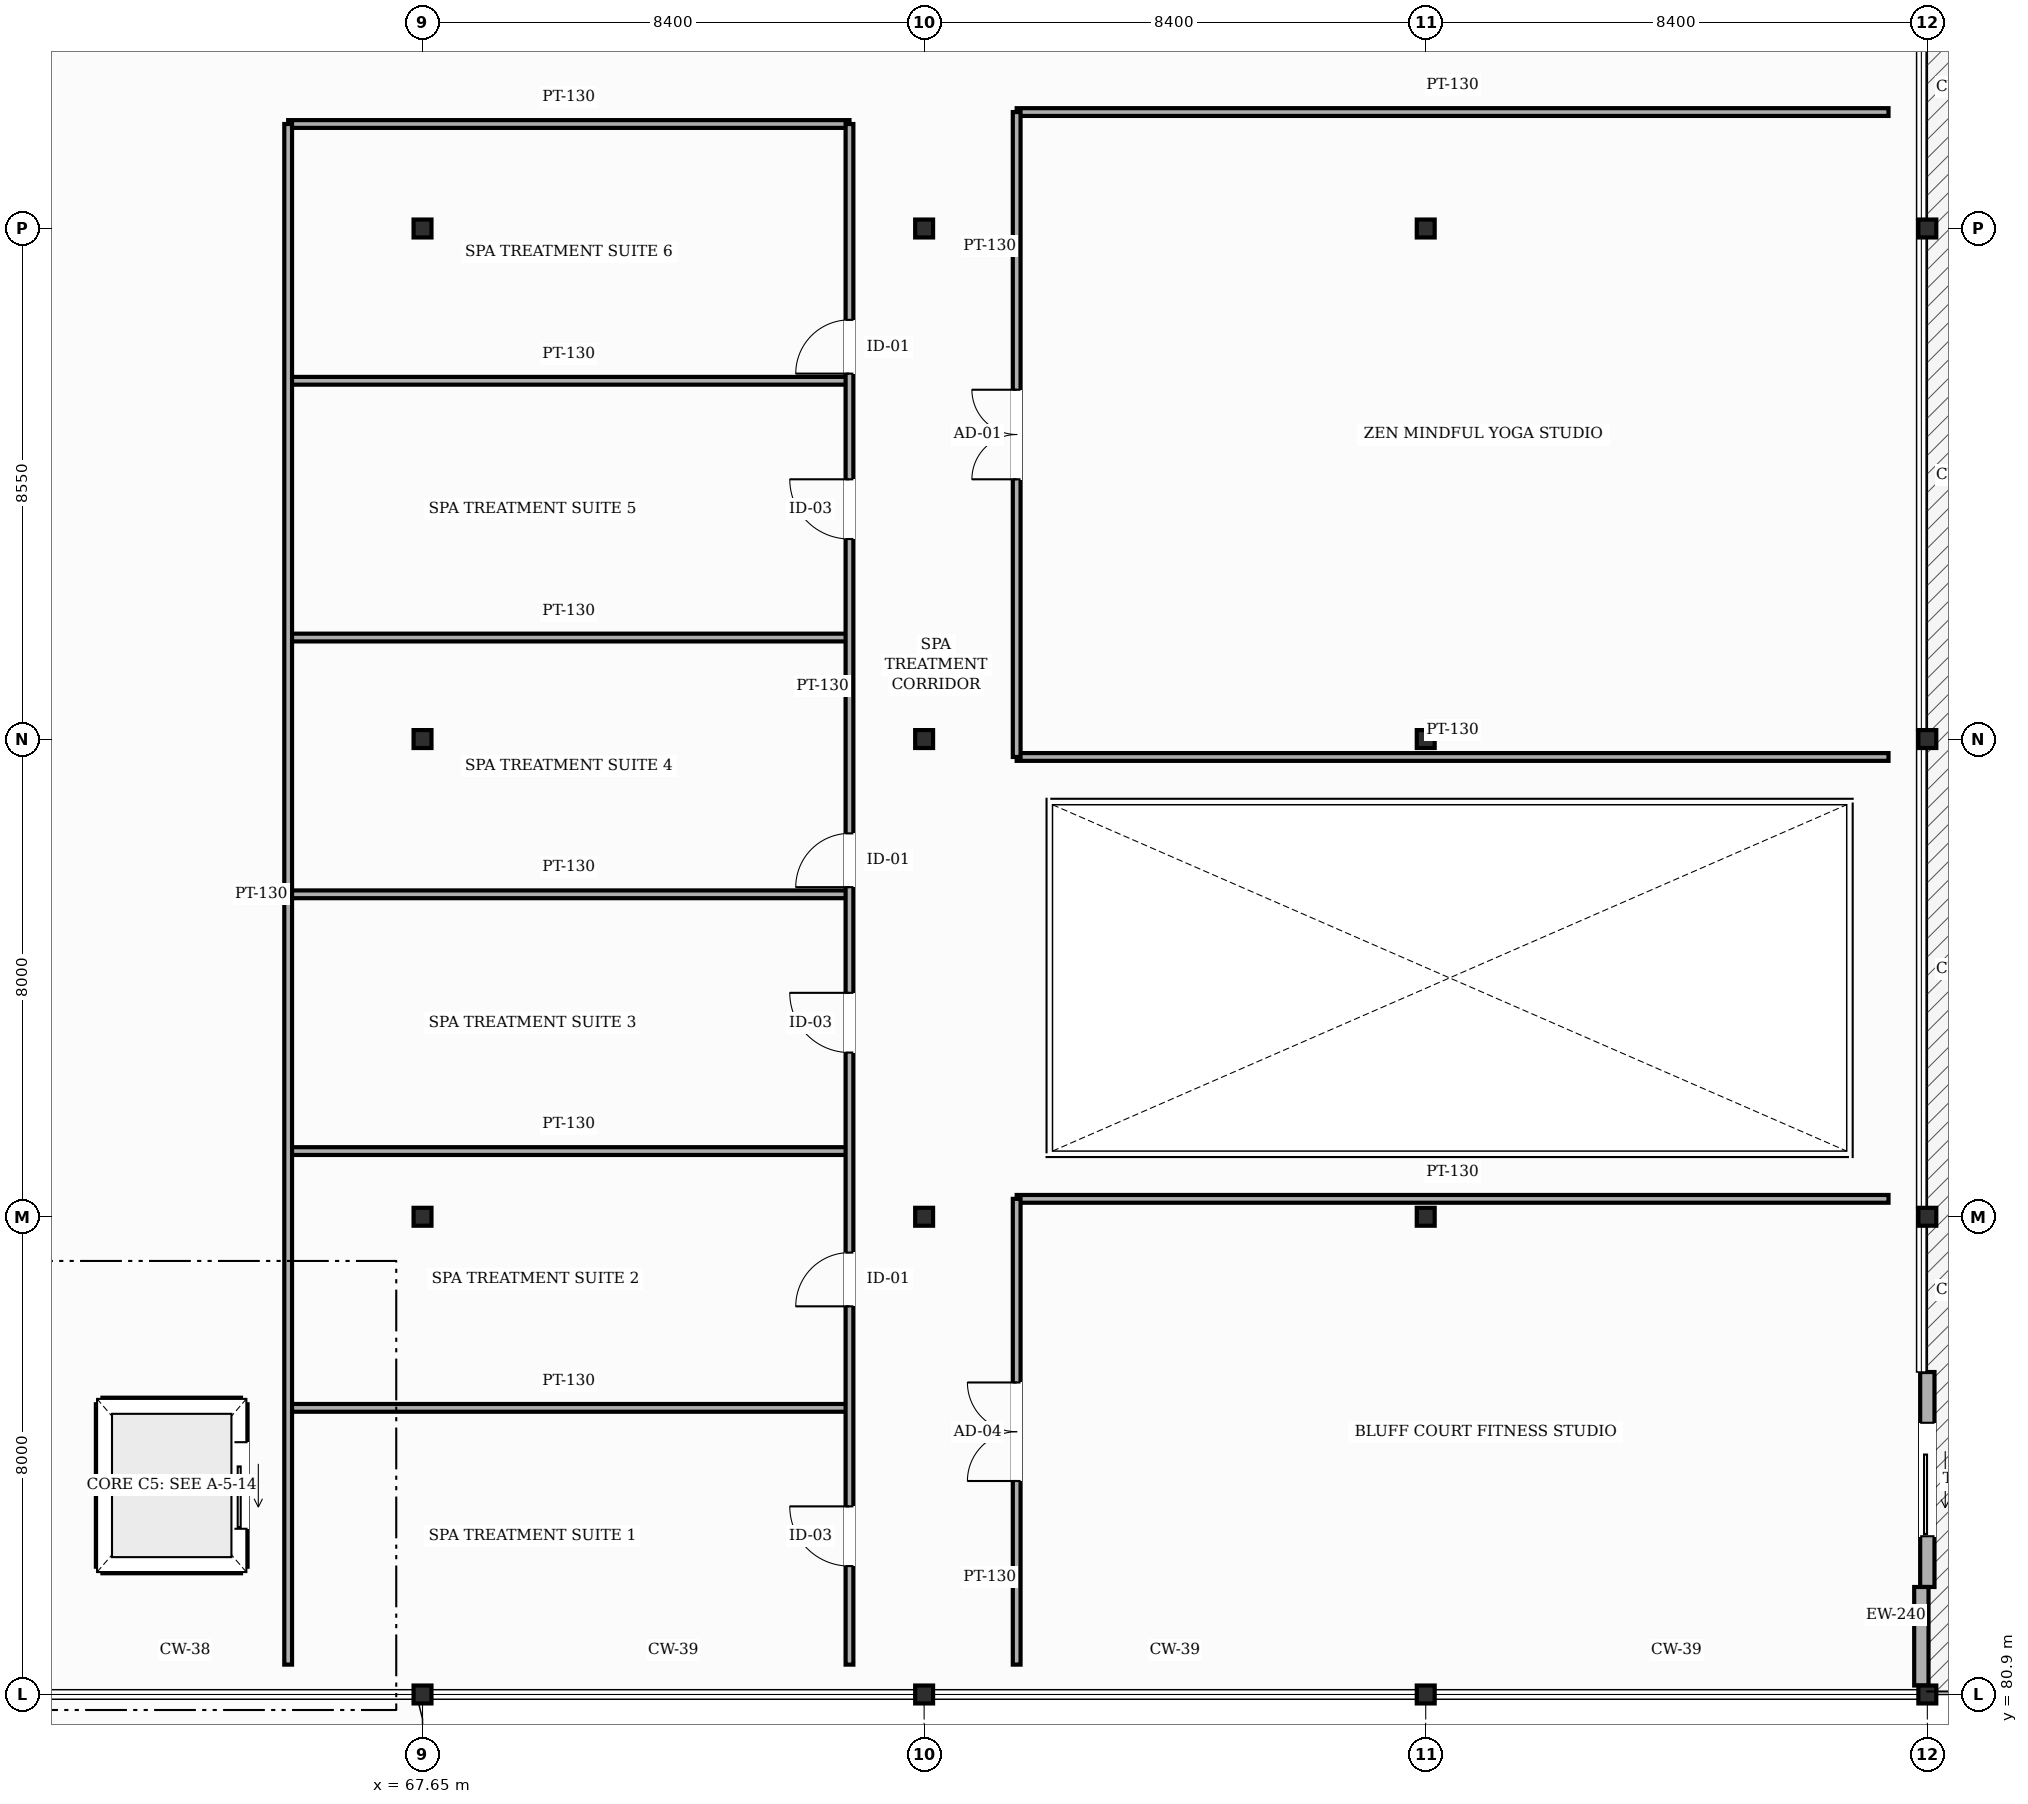
"""IFC4 building model, lengths in metres.
Left out: names, types, materials, properties, quantities, classifications, styles, units other than length and angle.
Written with IfcOpenShell. Run it as: python <this file> out.ifc"""

import sys

from ifc_helpers import new_model, si_unit, direction, frame, frame_2d, origin, origin_2d, place, context, subcontext, project, spatial, rectangle, i_section, extrude, element, fill, save


model = new_model("IFC4")
c1 = context("Model", 3, precision=1e-05, world=origin(), true_north=direction((0.0, 1.0)))
c2 = subcontext(c1, "Body", "Model", "MODEL_VIEW")
j1 = project(units=[si_unit("LENGTHUNIT", "METRE"), si_unit("PLANEANGLEUNIT", "RADIAN")], contexts=[c1])
p1 = place(None, origin())
s1 = spatial("IfcSite", under=j1, at=p1, CompositionType="ELEMENT")
p2 = place(p1, origin())
s2 = spatial("IfcBuilding", under=s1, at=p2, CompositionType="ELEMENT")
p3 = place(p2, frame((0.0, 0.0, 10.2)))
s3 = spatial("IfcBuildingStorey", under=s2, at=p3, CompositionType="ELEMENT", Elevation=10.2)
for number, where, z_axis, x_axis in (
    (1, (67.65, 80.9, 0.0), (0.0, 0.0, 1.0), (1.0, 0.0, 0.0)),
    (2, (67.65, 88.9, 0.0), (0.0, 0.0, 1.0), (1.0, 0.0, 0.0)),
    (3, (67.65, 96.9, 0.0), (0.0, 0.0, 1.0), (1.0, 0.0, 0.0)),
    (4, (67.65, 105.45, 0.0), (0.0, 0.0, 1.0), (1.0, 0.0, 0.0)),
    (5, (76.05, 80.9, 0.0), (0.0, 0.0, 1.0), (1.0, 0.0, 0.0)),
    (6, (76.05, 88.9, 0.0), (0.0, 0.0, 1.0), (1.0, 0.0, 0.0)),
    (7, (76.05, 96.9, 0.0), (0.0, 0.0, 1.0), (1.0, 0.0, 0.0)),
    (8, (76.05, 105.45, 0.0), (0.0, 0.0, 1.0), (1.0, 0.0, 0.0)),
    (9, (84.45, 80.9, 0.0), (0.0, 0.0, 1.0), (1.0, 0.0, 0.0)),
    (10, (84.45, 88.9, 0.0), (0.0, 0.0, 1.0), (1.0, 0.0, 0.0)),
    (11, (84.45, 96.9, 0.0), (0.0, 0.0, 1.0), (1.0, 0.0, 0.0)),
    (12, (84.45, 105.45, 0.0), (0.0, 0.0, 1.0), (1.0, 0.0, 0.0)),
    (13, (92.85, 80.9, 0.0), (0.0, 0.0, 1.0), (1.0, 0.0, 0.0)),
    (14, (92.85, 88.9, 0.0), (0.0, 0.0, 1.0), (1.0, 0.0, 0.0)),
    (15, (92.85, 96.9, 0.0), (0.0, 0.0, 1.0), (1.0, 0.0, 0.0)),
    (16, (92.85, 105.45, 0.0), (0.0, 0.0, 1.0), (1.0, 0.0, 0.0)),
):
    element("IfcColumn", number, at=place(p3, frame(where, z_axis=z_axis, x_axis=x_axis)), inside=s3, PredefinedType="COLUMN", context=c2, shape_type="SweptSolid", body=[
        extrude(i_section(OverallWidth=0.3, OverallDepth=0.3, WebThickness=0.01, FlangeThickness=0.015, FilletRadius=0.013, at=origin_2d()), origin(), (0.0, 0.0, 1.0), 4.8),
    ])
p4 = place(p3, frame((92.85, 82.7, 0.0), z_axis=(0.0, 0.0, 1.0), x_axis=(0.0, 1.0, 0.0)))
e17 = element("IfcWall", 17, at=p4, inside=s3, PredefinedType="SOLIDWALL", context=c2, shape_type="SweptSolid", body=[
    extrude(rectangle(XDim=3.6, YDim=0.24, at=frame_2d((1.8, 0.0))), origin(), (0.0, 0.0, 1.0), 4.545),
])
p5 = place(p4, frame((0.85, 0.0, 0.0)))
e18 = element("IfcOpeningElement", 18, at=p5, cuts=e17, PredefinedType="OPENING", context=c2, shape_type="SweptSolid", body=[
    extrude(rectangle(XDim=1.9, YDim=2.35, at=frame_2d((0.95, 1.175))), frame((0.0, 0.13, 0.0), z_axis=(0.0, -1.0, 0.0), x_axis=(1.0, 0.0, 0.0)), (0.0, 0.0, 1.0), 0.26),
])
p6 = place(p3, frame((92.75, 82.7, 0.0), z_axis=(0.0, 0.0, 1.0), x_axis=(0.0, -1.0, 0.0)))
e19 = element("IfcWall", 19, at=p6, inside=s3, PredefinedType="SOLIDWALL", context=c2, shape_type="SweptSolid", body=[
    extrude(rectangle(XDim=1.65, YDim=0.24, at=frame_2d((0.825, 0.0))), origin(), (0.0, 0.0, 1.0), 4.545),
])
for number, where, z_axis, x_axis in (
    (20, (62.29, 85.76, 0.0), (0.0, 0.0, 1.0), (1.0, 0.0, 0.0)),
    (21, (62.29, 83.04, 0.0), (0.0, 0.0, 1.0), (1.0, 0.0, 0.0)),
):
    element("IfcWall", number, at=place(p3, frame(where, z_axis=z_axis, x_axis=x_axis)), inside=s3, PredefinedType="SHEAR", context=c2, shape_type="SweptSolid", body=[
        extrude(rectangle(XDim=2.32, YDim=0.22, at=frame_2d((1.16, 0.0))), origin(), (0.0, 0.0, 1.0), 4.56),
    ])
p7 = place(p3, frame((64.61, 83.04, 0.0), z_axis=(0.0, 0.0, 1.0), x_axis=(0.0, 1.0, 0.0)))
e22 = element("IfcWall", 22, at=p7, inside=s3, PredefinedType="SHEAR", context=c2, shape_type="SweptSolid", body=[
    extrude(rectangle(XDim=2.72, YDim=0.22, at=frame_2d((1.36, 0.0))), origin(), (0.0, 0.0, 1.0), 4.56),
])
p8 = place(p7, frame((0.635, 0.0, 0.0)))
e23 = element("IfcOpeningElement", 23, at=p8, cuts=e22, PredefinedType="OPENING", context=c2, shape_type="SweptSolid", body=[
    extrude(rectangle(XDim=1.45, YDim=2.35, at=frame_2d((0.725, 1.175))), frame((0.0, 0.12, 0.0), z_axis=(0.0, -1.0, 0.0), x_axis=(1.0, 0.0, 0.0)), (0.0, 0.0, 1.0), 0.24),
])
p9 = place(p3, frame((62.29, 83.04, 0.0), z_axis=(0.0, 0.0, 1.0), x_axis=(0.0, 1.0, 0.0)))
e24 = element("IfcWall", 24, at=p9, inside=s3, PredefinedType="SHEAR", context=c2, shape_type="SweptSolid", body=[
    extrude(rectangle(XDim=2.72, YDim=0.22, at=frame_2d((1.36, 0.0))), origin(), (0.0, 0.0, 1.0), 4.56),
])
p10 = place(p3, frame((65.4, 85.7, 0.0), z_axis=(0.0, 0.0, 1.0), x_axis=(1.0, 0.0, 0.0)))
e25 = element("IfcWall", 25, at=p10, inside=s3, PredefinedType="PARTITIONING", context=c2, shape_type="SweptSolid", body=[
    extrude(rectangle(XDim=9.4, YDim=0.13, at=frame_2d((4.7, 0.0))), origin(), (0.0, 0.0, 1.0), 4.545),
])
p11 = place(p3, frame((77.6, 89.2, 0.0), z_axis=(0.0, 0.0, 1.0), x_axis=(1.0, 0.0, 0.0)))
e26 = element("IfcWall", 26, at=p11, inside=s3, PredefinedType="PARTITIONING", context=c2, shape_type="SweptSolid", body=[
    extrude(rectangle(XDim=14.6, YDim=0.13, at=frame_2d((7.3, 0.0))), origin(), (0.0, 0.0, 1.0), 4.545),
])
for number, where, z_axis, x_axis in (
    (27, (65.4, 90.0, 0.0), (0.0, 0.0, 1.0), (1.0, 0.0, 0.0)),
    (28, (65.4, 94.3, 0.0), (0.0, 0.0, 1.0), (1.0, 0.0, 0.0)),
):
    element("IfcWall", number, at=place(p3, frame(where, z_axis=z_axis, x_axis=x_axis)), inside=s3, PredefinedType="PARTITIONING", context=c2, shape_type="SweptSolid", body=[
        extrude(rectangle(XDim=9.4, YDim=0.13, at=frame_2d((4.7, 0.0))), origin(), (0.0, 0.0, 1.0), 4.545),
    ])
p12 = place(p3, frame((77.6, 96.6, 0.0), z_axis=(0.0, 0.0, 1.0), x_axis=(1.0, 0.0, 0.0)))
e29 = element("IfcWall", 29, at=p12, inside=s3, PredefinedType="PARTITIONING", context=c2, shape_type="SweptSolid", body=[
    extrude(rectangle(XDim=14.6, YDim=0.13, at=frame_2d((7.3, 0.0))), origin(), (0.0, 0.0, 1.0), 4.545),
])
for number, where, z_axis, x_axis in (
    (30, (65.4, 98.6, 0.0), (0.0, 0.0, 1.0), (1.0, 0.0, 0.0)),
    (31, (65.4, 102.9, 0.0), (0.0, 0.0, 1.0), (1.0, 0.0, 0.0)),
    (32, (65.4, 107.2, 0.0), (0.0, 0.0, 1.0), (1.0, 0.0, 0.0)),
):
    element("IfcWall", number, at=place(p3, frame(where, z_axis=z_axis, x_axis=x_axis)), inside=s3, PredefinedType="PARTITIONING", context=c2, shape_type="SweptSolid", body=[
        extrude(rectangle(XDim=9.4, YDim=0.13, at=frame_2d((4.7, 0.0))), origin(), (0.0, 0.0, 1.0), 4.545),
    ])
p13 = place(p3, frame((77.6, 107.4, 0.0), z_axis=(0.0, 0.0, 1.0), x_axis=(1.0, 0.0, 0.0)))
e33 = element("IfcWall", 33, at=p13, inside=s3, PredefinedType="PARTITIONING", context=c2, shape_type="SweptSolid", body=[
    extrude(rectangle(XDim=14.6, YDim=0.13, at=frame_2d((7.3, 0.0))), origin(), (0.0, 0.0, 1.0), 4.545),
])
p14 = place(p3, frame((65.4, 81.4, 0.0), z_axis=(0.0, 0.0, 1.0), x_axis=(0.0, 1.0, 0.0)))
e34 = element("IfcWall", 34, at=p14, inside=s3, PredefinedType="PARTITIONING", context=c2, shape_type="SweptSolid", body=[
    extrude(rectangle(XDim=25.8, YDim=0.13, at=frame_2d((12.9, 0.0))), origin(), (0.0, 0.0, 1.0), 4.545),
])
p15 = place(p3, frame((74.8, 81.4, 0.0), z_axis=(0.0, 0.0, 1.0), x_axis=(0.0, 1.0, 0.0)))
e35 = element("IfcWall", 35, at=p15, inside=s3, PredefinedType="PARTITIONING", context=c2, shape_type="SweptSolid", body=[
    extrude(rectangle(XDim=25.8, YDim=0.13, at=frame_2d((12.9, 0.0))), origin(), (0.0, 0.0, 1.0), 4.545),
])
p16 = place(p15, frame((1.65, 0.0, 0.0)))
e36 = element("IfcOpeningElement", 36, at=p16, cuts=e35, PredefinedType="OPENING", context=c2, shape_type="SweptSolid", body=[
    extrude(rectangle(XDim=1.0, YDim=2.18, at=frame_2d((0.5, 1.09))), frame((0.0, 0.075, 0.0), z_axis=(0.0, -1.0, 0.0), x_axis=(1.0, 0.0, 0.0)), (0.0, 0.0, 1.0), 0.15),
])
p17 = place(p15, frame((6.0, 0.0, 0.0)))
e37 = element("IfcOpeningElement", 37, at=p17, cuts=e35, PredefinedType="OPENING", context=c2, shape_type="SweptSolid", body=[
    extrude(rectangle(XDim=0.9, YDim=2.15, at=frame_2d((0.45, 1.075))), frame((0.0, 0.075, 0.0), z_axis=(0.0, -1.0, 0.0), x_axis=(1.0, 0.0, 0.0)), (0.0, 0.0, 1.0), 0.15),
])
p18 = place(p15, frame((10.25, 0.0, 0.0)))
e38 = element("IfcOpeningElement", 38, at=p18, cuts=e35, PredefinedType="OPENING", context=c2, shape_type="SweptSolid", body=[
    extrude(rectangle(XDim=1.0, YDim=2.18, at=frame_2d((0.5, 1.09))), frame((0.0, 0.075, 0.0), z_axis=(0.0, -1.0, 0.0), x_axis=(1.0, 0.0, 0.0)), (0.0, 0.0, 1.0), 0.15),
])
p19 = place(p15, frame((13.02, 0.0, 0.0)))
e39 = element("IfcOpeningElement", 39, at=p19, cuts=e35, PredefinedType="OPENING", context=c2, shape_type="SweptSolid", body=[
    extrude(rectangle(XDim=0.9, YDim=2.15, at=frame_2d((0.45, 1.075))), frame((0.0, 0.075, 0.0), z_axis=(0.0, -1.0, 0.0), x_axis=(1.0, 0.0, 0.0)), (0.0, 0.0, 1.0), 0.15),
])
p20 = place(p15, frame((18.85, 0.0, 0.0)))
e40 = element("IfcOpeningElement", 40, at=p20, cuts=e35, PredefinedType="OPENING", context=c2, shape_type="SweptSolid", body=[
    extrude(rectangle(XDim=1.0, YDim=2.18, at=frame_2d((0.5, 1.09))), frame((0.0, 0.075, 0.0), z_axis=(0.0, -1.0, 0.0), x_axis=(1.0, 0.0, 0.0)), (0.0, 0.0, 1.0), 0.15),
])
p21 = place(p15, frame((21.62, 0.0, 0.0)))
e41 = element("IfcOpeningElement", 41, at=p21, cuts=e35, PredefinedType="OPENING", context=c2, shape_type="SweptSolid", body=[
    extrude(rectangle(XDim=0.9, YDim=2.15, at=frame_2d((0.45, 1.075))), frame((0.0, 0.075, 0.0), z_axis=(0.0, -1.0, 0.0), x_axis=(1.0, 0.0, 0.0)), (0.0, 0.0, 1.0), 0.15),
])
p22 = place(p3, frame((77.6, 81.4, 0.0), z_axis=(0.0, 0.0, 1.0), x_axis=(0.0, 1.0, 0.0)))
e42 = element("IfcWall", 42, at=p22, inside=s3, PredefinedType="PARTITIONING", context=c2, shape_type="SweptSolid", body=[
    extrude(rectangle(XDim=7.8, YDim=0.13, at=frame_2d((3.9, 0.0))), origin(), (0.0, 0.0, 1.0), 4.545),
])
p23 = place(p22, frame((3.075, 0.0, 0.0)))
e43 = element("IfcOpeningElement", 43, at=p23, cuts=e42, PredefinedType="OPENING", context=c2, shape_type="SweptSolid", body=[
    extrude(rectangle(XDim=1.65, YDim=2.35, at=frame_2d((0.825, 1.175))), frame((0.0, 0.075, 0.0), z_axis=(0.0, -1.0, 0.0), x_axis=(1.0, 0.0, 0.0)), (0.0, 0.0, 1.0), 0.15),
])
p24 = place(p3, frame((77.6, 96.6, 0.0), z_axis=(0.0, 0.0, 1.0), x_axis=(0.0, 1.0, 0.0)))
e44 = element("IfcWall", 44, at=p24, inside=s3, PredefinedType="PARTITIONING", context=c2, shape_type="SweptSolid", body=[
    extrude(rectangle(XDim=10.8, YDim=0.13, at=frame_2d((5.4, 0.0))), origin(), (0.0, 0.0, 1.0), 4.545),
])
p25 = place(p24, frame((4.65, 0.0, 0.0)))
e45 = element("IfcOpeningElement", 45, at=p25, cuts=e44, PredefinedType="OPENING", context=c2, shape_type="SweptSolid", body=[
    extrude(rectangle(XDim=1.5, YDim=2.3, at=frame_2d((0.75, 1.15))), frame((0.0, 0.075, 0.0), z_axis=(0.0, -1.0, 0.0), x_axis=(1.0, 0.0, 0.0)), (0.0, 0.0, 1.0), 0.15),
])
p26 = place(p5, origin())
e46 = element("IfcDoor", 46, at=p26, inside=s3, OperationType="SLIDING_TO_LEFT", PredefinedType="DOOR", context=c2, shape_type="SweptSolid", body=[
    extrude(rectangle(XDim=1.9, YDim=2.35, at=frame_2d((0.95, 1.175))), frame((0.0, 0.025, 0.0), z_axis=(0.0, -1.0, 0.0), x_axis=(1.0, 0.0, 0.0)), (0.0, 0.0, 1.0), 0.05),
])
fill(e18, e46)
p27 = place(p8, origin())
e47 = element("IfcDoor", 47, at=p27, inside=s3, OperationType="SLIDING_TO_LEFT", PredefinedType="DOOR", context=c2, shape_type="SweptSolid", body=[
    extrude(rectangle(XDim=1.45, YDim=2.35, at=frame_2d((0.725, 1.175))), frame((0.0, 0.025, 0.0), z_axis=(0.0, -1.0, 0.0), x_axis=(1.0, 0.0, 0.0)), (0.0, 0.0, 1.0), 0.05),
])
fill(e23, e47)
p28 = place(p23, origin())
e48 = element("IfcDoor", 48, at=p28, inside=s3, OperationType="DOUBLE_DOOR_SINGLE_SWING", PredefinedType="DOOR", context=c2, shape_type="SweptSolid", body=[
    extrude(rectangle(XDim=1.65, YDim=2.35, at=frame_2d((0.825, 1.175))), frame((0.0, 0.025, 0.0), z_axis=(0.0, -1.0, 0.0), x_axis=(1.0, 0.0, 0.0)), (0.0, 0.0, 1.0), 0.05),
])
fill(e43, e48)
p29 = place(p25, origin())
e49 = element("IfcDoor", 49, at=p29, inside=s3, OperationType="DOUBLE_DOOR_SINGLE_SWING", PredefinedType="DOOR", context=c2, shape_type="SweptSolid", body=[
    extrude(rectangle(XDim=1.5, YDim=2.3, at=frame_2d((0.75, 1.15))), frame((0.0, 0.025, 0.0), z_axis=(0.0, -1.0, 0.0), x_axis=(1.0, 0.0, 0.0)), (0.0, 0.0, 1.0), 0.05),
])
fill(e45, e49)
p30 = place(p16, origin())
e50 = element("IfcDoor", 50, at=p30, inside=s3, OperationType="SINGLE_SWING_RIGHT", PredefinedType="DOOR", context=c2, shape_type="SweptSolid", body=[
    extrude(rectangle(XDim=1.0, YDim=2.18, at=frame_2d((0.5, 1.09))), frame((0.0, 0.025, 0.0), z_axis=(0.0, -1.0, 0.0), x_axis=(1.0, 0.0, 0.0)), (0.0, 0.0, 1.0), 0.05),
])
fill(e36, e50)
p31 = place(p17, origin())
e51 = element("IfcDoor", 51, at=p31, inside=s3, OperationType="SINGLE_SWING_LEFT", PredefinedType="DOOR", context=c2, shape_type="SweptSolid", body=[
    extrude(rectangle(XDim=0.9, YDim=2.15, at=frame_2d((0.45, 1.075))), frame((0.0, 0.025, 0.0), z_axis=(0.0, -1.0, 0.0), x_axis=(1.0, 0.0, 0.0)), (0.0, 0.0, 1.0), 0.05),
])
fill(e37, e51)
p32 = place(p18, origin())
e52 = element("IfcDoor", 52, at=p32, inside=s3, OperationType="SINGLE_SWING_RIGHT", PredefinedType="DOOR", context=c2, shape_type="SweptSolid", body=[
    extrude(rectangle(XDim=1.0, YDim=2.18, at=frame_2d((0.5, 1.09))), frame((0.0, 0.025, 0.0), z_axis=(0.0, -1.0, 0.0), x_axis=(1.0, 0.0, 0.0)), (0.0, 0.0, 1.0), 0.05),
])
fill(e38, e52)
p33 = place(p19, origin())
e53 = element("IfcDoor", 53, at=p33, inside=s3, OperationType="SINGLE_SWING_LEFT", PredefinedType="DOOR", context=c2, shape_type="SweptSolid", body=[
    extrude(rectangle(XDim=0.9, YDim=2.15, at=frame_2d((0.45, 1.075))), frame((0.0, 0.025, 0.0), z_axis=(0.0, -1.0, 0.0), x_axis=(1.0, 0.0, 0.0)), (0.0, 0.0, 1.0), 0.05),
])
fill(e39, e53)
p34 = place(p20, origin())
e54 = element("IfcDoor", 54, at=p34, inside=s3, OperationType="SINGLE_SWING_RIGHT", PredefinedType="DOOR", context=c2, shape_type="SweptSolid", body=[
    extrude(rectangle(XDim=1.0, YDim=2.18, at=frame_2d((0.5, 1.09))), frame((0.0, 0.025, 0.0), z_axis=(0.0, -1.0, 0.0), x_axis=(1.0, 0.0, 0.0)), (0.0, 0.0, 1.0), 0.05),
])
fill(e40, e54)
p35 = place(p21, origin())
e55 = element("IfcDoor", 55, at=p35, inside=s3, OperationType="SINGLE_SWING_LEFT", PredefinedType="DOOR", context=c2, shape_type="SweptSolid", body=[
    extrude(rectangle(XDim=0.9, YDim=2.15, at=frame_2d((0.45, 1.075))), frame((0.0, 0.025, 0.0), z_axis=(0.0, -1.0, 0.0), x_axis=(1.0, 0.0, 0.0)), (0.0, 0.0, 1.0), 0.05),
])
fill(e41, e55)
save(model, sys.argv[1])
